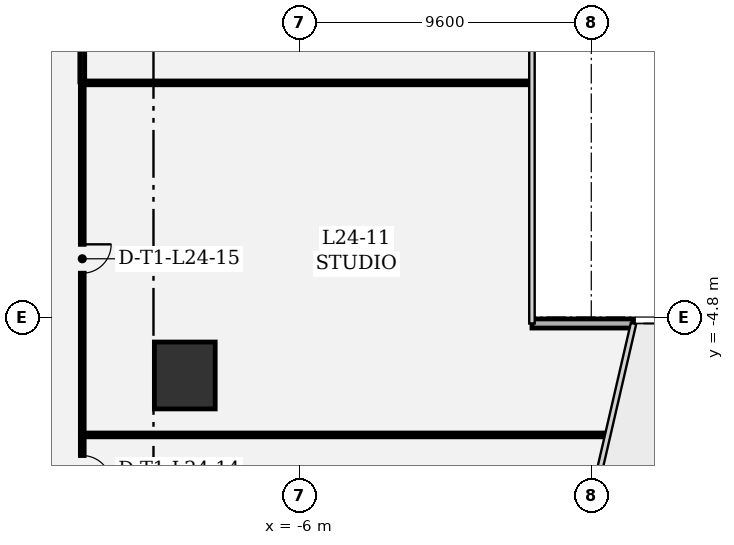
"""IFC4 building model, lengths in metres.
Left out: names, types, materials, properties, quantities, classifications, styles, units other than length and angle.
Written with IfcOpenShell. Run it as: python <this file> out.ifc"""

import sys

from ifc_helpers import new_model, si_unit, direction, frame, frame_2d, origin, origin_2d, place, context, subcontext, project, spatial, rectangle, extrude, element, fill, save


model = new_model("IFC4")
c1 = context("Model", 3, precision=1e-05, world=origin(), true_north=direction((0.0, 1.0)))
c2 = subcontext(c1, "Body", "Model", "MODEL_VIEW")
j1 = project(units=[si_unit("LENGTHUNIT", "METRE"), si_unit("PLANEANGLEUNIT", "RADIAN")], contexts=[c1])
p1 = place(None, origin())
s1 = spatial("IfcSite", under=j1, at=p1, CompositionType="ELEMENT")
p2 = place(p1, origin())
s2 = spatial("IfcBuilding", under=s1, at=p2, CompositionType="ELEMENT")
p3 = place(p2, frame((0.0, 0.0, 109.8)))
s3 = spatial("IfcBuildingStorey", under=s2, at=p3, CompositionType="ELEMENT", Elevation=109.8)
p4 = place(p3, frame((-9.77, -6.721, 0.0), z_axis=(0.0, 0.0, 1.0), x_axis=(1.0, 0.0, 0.0)))
e1 = element("IfcColumn", 1, at=p4, inside=s3, PredefinedType="COLUMN", context=c2, shape_type="SweptSolid", body=[
    extrude(rectangle(XDim=2.0, YDim=2.2, at=origin_2d()), origin(), (0.0, 0.0, 1.0), 4.05),
])
p5 = place(p3, frame((4.99, -5.011, 0.0), z_axis=(0.0, 0.0, 1.0), x_axis=(-1.0, 0.0, 0.0)))
e2 = element("IfcWall", 2, at=p5, inside=s3, PredefinedType="SOLIDWALL", context=c2, shape_type="SweptSolid", body=[
    extrude(rectangle(XDim=3.341, YDim=0.3, at=frame_2d((1.67, 0.0))), origin(), (0.0, 0.0, 1.0), 3.77),
])
p6 = place(p3, frame((4.062, -8.677, 0.0), z_axis=(0.0, 0.0, 1.0), x_axis=(-1.0, 0.0, 0.0)))
e3 = element("IfcWall", 3, at=p6, inside=s3, PredefinedType="PARTITIONING", context=c2, shape_type="SweptSolid", body=[
    extrude(rectangle(XDim=17.179, YDim=0.125, at=frame_2d((8.59, 0.0))), origin(), (0.0, 0.0, 1.0), 2.885),
])
p7 = place(p3, frame((-13.142, -8.702, 0.0), z_axis=(0.0, 0.0, 1.0), x_axis=(0.0, -1.0, 0.0)))
e4 = element("IfcWall", 4, at=p7, inside=s3, PredefinedType="PARTITIONING", context=c2, shape_type="SweptSolid", body=[
    extrude(rectangle(XDim=2.256, YDim=0.125, at=frame_2d((1.128, 0.0))), origin(), (0.0, 0.0, 1.0), 3.77),
])
p8 = place(p7, frame((0.653, 0.0, 0.0)))
e5 = element("IfcOpeningElement", 5, at=p8, cuts=e4, PredefinedType="OPENING", context=c2, shape_type="SweptSolid", body=[
    extrude(rectangle(XDim=0.95, YDim=2.15, at=frame_2d((0.475, 1.075))), frame((0.0, 0.073, 0.0), z_axis=(0.0, -1.0, 0.0), x_axis=(1.0, 0.0, 0.0)), (0.0, 0.0, 1.0), 0.145),
])
p9 = place(p3, frame((1.569, 2.903, 0.0), z_axis=(0.0, 0.0, 1.0), x_axis=(-1.0, 0.0, 0.0)))
e6 = element("IfcWall", 6, at=p9, inside=s3, PredefinedType="PARTITIONING", context=c2, shape_type="SweptSolid", body=[
    extrude(rectangle(XDim=14.686, YDim=0.125, at=frame_2d((7.343, 0.0))), origin(), (0.0, 0.0, 1.0), 3.77),
])
p10 = place(p3, frame((-13.142, 2.878, 0.0), z_axis=(0.0, 0.0, 1.0), x_axis=(0.0, -1.0, 0.0)))
e7 = element("IfcWall", 7, at=p10, inside=s3, PredefinedType="PARTITIONING", context=c2, shape_type="SweptSolid", body=[
    extrude(rectangle(XDim=11.523, YDim=0.125, at=frame_2d((5.761, 0.0))), origin(), (0.0, 0.0, 1.0), 3.77),
])
p11 = place(p10, frame((5.286, 0.0, 0.0)))
e8 = element("IfcOpeningElement", 8, at=p11, cuts=e7, PredefinedType="OPENING", context=c2, shape_type="SweptSolid", body=[
    extrude(rectangle(XDim=0.95, YDim=2.15, at=frame_2d((0.475, 1.075))), frame((0.0, 0.073, 0.0), z_axis=(0.0, -1.0, 0.0), x_axis=(1.0, 0.0, 0.0)), (0.0, 0.0, 1.0), 0.145),
])
p12 = place(p3, frame((-13.142, 8.287, 0.0), z_axis=(0.0, 0.0, 1.0), x_axis=(0.0, -1.0, 0.0)))
e9 = element("IfcWall", 9, at=p12, inside=s3, PredefinedType="PARTITIONING", context=c2, shape_type="SweptSolid", body=[
    extrude(rectangle(XDim=5.351, YDim=0.16, at=frame_2d((2.676, 0.0))), origin(), (0.0, 0.0, 1.0), 3.77),
])
p13 = place(p8, origin())
e10 = element("IfcDoor", 10, at=p13, inside=s3, OperationType="SINGLE_SWING_RIGHT", PredefinedType="DOOR", context=c2, shape_type="SweptSolid", body=[
    extrude(rectangle(XDim=0.95, YDim=2.15, at=frame_2d((0.475, 1.075))), frame((0.0, 0.025, 0.0), z_axis=(0.0, -1.0, 0.0), x_axis=(1.0, 0.0, 0.0)), (0.0, 0.0, 1.0), 0.05),
])
fill(e5, e10)
p14 = place(p11, origin())
e11 = element("IfcDoor", 11, at=p14, inside=s3, OperationType="SINGLE_SWING_LEFT", PredefinedType="DOOR", context=c2, shape_type="SweptSolid", body=[
    extrude(rectangle(XDim=0.95, YDim=2.15, at=frame_2d((0.475, 1.075))), frame((0.0, 0.025, 0.0), z_axis=(0.0, -1.0, 0.0), x_axis=(1.0, 0.0, 0.0)), (0.0, 0.0, 1.0), 0.05),
])
fill(e8, e11)
save(model, sys.argv[1])
